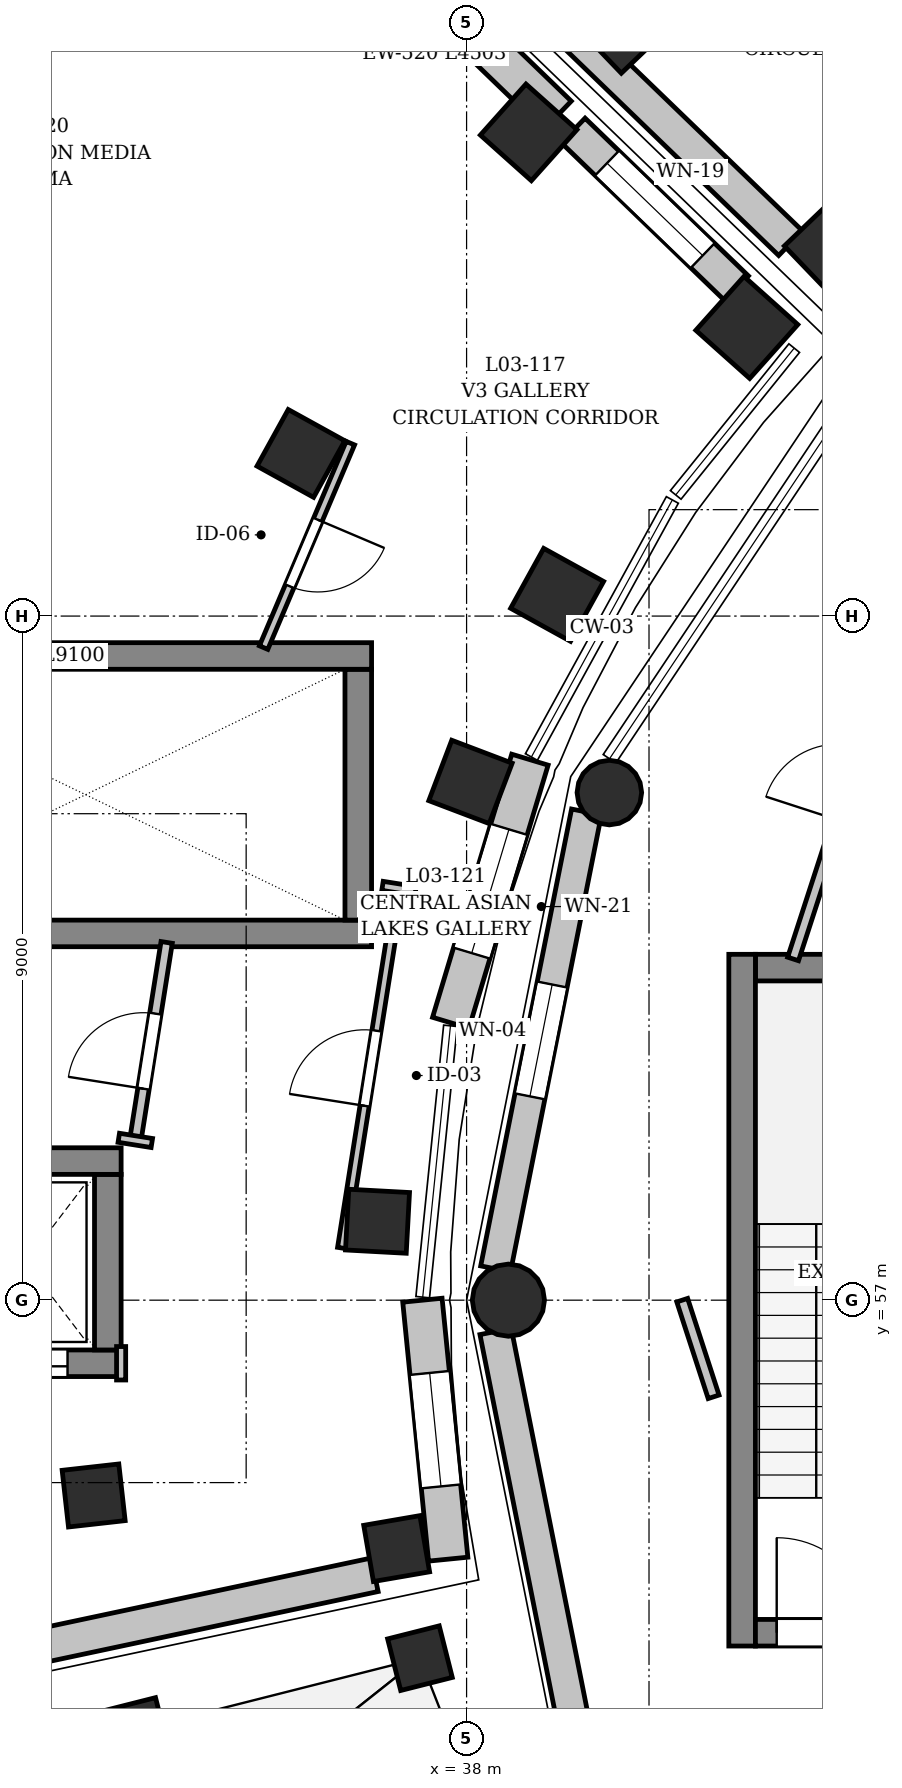
"""IFC4 building model, lengths in metres.
Left out: names, types, materials, properties, quantities, classifications, styles, units other than length and angle.
Written with IfcOpenShell. Run it as: python <this file> out.ifc"""

import sys

from ifc_helpers import new_model, si_unit, direction, frame, frame_2d, origin, origin_2d, place, context, subcontext, project, spatial, rectangle, circle, extrude, element, fill, save


model = new_model("IFC4")
c1 = context("Model", 3, precision=1e-05, world=origin(), true_north=direction((0.0, 1.0)))
c2 = subcontext(c1, "Body", "Model", "MODEL_VIEW")
j1 = project(units=[si_unit("LENGTHUNIT", "METRE"), si_unit("PLANEANGLEUNIT", "RADIAN")], contexts=[c1])
p1 = place(None, origin())
s1 = spatial("IfcSite", under=j1, at=p1, CompositionType="ELEMENT")
p2 = place(p1, origin())
s2 = spatial("IfcBuilding", under=s1, at=p2, CompositionType="ELEMENT")
p3 = place(p2, frame((0.0, 0.0, 10.2)))
s3 = spatial("IfcBuildingStorey", under=s2, at=p3, CompositionType="ELEMENT", Elevation=10.2)
p4 = place(p3, frame((39.878, 63.678, 0.0), z_axis=(0.0, 0.0, 1.0), x_axis=(-0.923879532511, 0.382683432365, 0.0)))
e1 = element("IfcColumn", 1, at=p4, inside=s3, PredefinedType="COLUMN", context=c2, shape_type="SweptSolid", body=[
    extrude(circle(Radius=0.425, at=origin_2d()), origin(), (0.0, 0.0, 1.0), 4.45),
])
p5 = place(p3, frame((38.55, 57.0, 0.0), z_axis=(0.0, 0.0, 1.0), x_axis=(-1.0, 0.0, 0.0)))
e2 = element("IfcColumn", 2, at=p5, inside=s3, PredefinedType="COLUMN", context=c2, shape_type="SweptSolid", body=[
    extrude(circle(Radius=0.475, at=origin_2d()), origin(), (0.0, 0.0, 1.0), 4.45),
])
p6 = place(p3, frame((41.687, 69.797, 0.0), z_axis=(0.0, 0.0, 1.0), x_axis=(-0.745475999683, 0.666532470249, 0.0)))
e3 = element("IfcColumn", 3, at=p6, inside=s3, PredefinedType="COLUMN", context=c2, shape_type="SweptSolid", body=[
    extrude(rectangle(XDim=0.95, YDim=0.95, at=origin_2d()), origin(), (0.0, 0.0, 1.0), 4.58),
])
for number, where, z_axis, x_axis in (
    (4, (38.817, 72.364, 0.0), (0.0, 0.0, 1.0), (-0.745, 0.667, 0.0)),
    (5, (39.191, 66.279, 0.0), (0.0, 0.0, 1.0), (-0.875, 0.483, 0.0)),
):
    element("IfcColumn", number, at=place(p3, frame(where, z_axis=z_axis, x_axis=x_axis)), inside=s3, PredefinedType="COLUMN", context=c2, shape_type="SweptSolid", body=[
        extrude(rectangle(XDim=0.9, YDim=0.9, at=origin_2d()), origin(), (0.0, 0.0, 1.0), 4.58),
    ])
for number, where, z_axis, x_axis in (
    (6, (35.821, 68.14, 0.0), (0.0, 0.0, 1.0), (-0.875, 0.483, 0.0)),
    (7, (38.051, 63.818, 0.0), (0.0, 0.0, 1.0), (-0.935, 0.355, 0.0)),
):
    element("IfcColumn", number, at=place(p3, frame(where, z_axis=z_axis, x_axis=x_axis)), inside=s3, PredefinedType="COLUMN", context=c2, shape_type="SweptSolid", body=[
        extrude(rectangle(XDim=0.85, YDim=0.85, at=origin_2d()), origin(), (0.0, 0.0, 1.0), 4.58),
    ])
p7 = place(p3, frame((36.828, 58.038, 0.0), z_axis=(0.0, 0.0, 1.0), x_axis=(-0.998536670326, 0.054078812985, 0.0)))
e8 = element("IfcColumn", 8, at=p7, inside=s3, PredefinedType="COLUMN", context=c2, shape_type="SweptSolid", body=[
    extrude(rectangle(XDim=0.8, YDim=0.8, at=origin_2d()), origin(), (0.0, 0.0, 1.0), 4.58),
])
for number, where, z_axis, x_axis in (
    (9, (33.094, 54.431, 0.0), (0.0, 0.0, 1.0), (-0.994, -0.111, 0.0)),
    (10, (37.08, 53.732, 0.0), (0.0, 0.0, 1.0), (-0.985, -0.17, 0.0)),
):
    element("IfcColumn", number, at=place(p3, frame(where, z_axis=z_axis, x_axis=x_axis)), inside=s3, PredefinedType="COLUMN", context=c2, shape_type="SweptSolid", body=[
        extrude(rectangle(XDim=0.75, YDim=0.75, at=origin_2d()), origin(), (0.0, 0.0, 1.0), 4.58),
    ])
p8 = place(p3, frame((42.711, 70.858, 0.0), z_axis=(0.0, 0.0, 1.0), x_axis=(-0.69214317387, 0.721760228098, 0.0)))
e11 = element("IfcColumn", 11, at=p8, inside=s3, PredefinedType="COLUMN", context=c2, shape_type="SweptSolid", body=[
    extrude(rectangle(XDim=0.75, YDim=0.75, at=origin_2d()), origin(), (0.0, 0.0, 1.0), 4.52),
])
p9 = place(p3, frame((40.046, 73.637, 0.0), z_axis=(0.0, 0.0, 1.0), x_axis=(-0.69214317387, 0.721760228098, 0.0)))
e12 = element("IfcColumn", 12, at=p9, inside=s3, PredefinedType="COLUMN", context=c2, shape_type="SweptSolid", body=[
    extrude(rectangle(XDim=0.7, YDim=0.7, at=origin_2d()), origin(), (0.0, 0.0, 1.0), 4.52),
])
p10 = place(p3, frame((37.387, 52.29, -0.22), z_axis=(0.0, 0.0, 1.0), x_axis=(-0.969445349895, -0.245307385879, 0.0)))
e13 = element("IfcColumn", 13, at=p10, inside=s3, PredefinedType="COLUMN", context=c2, shape_type="SweptSolid", body=[
    extrude(rectangle(XDim=0.7, YDim=0.7, at=origin_2d()), origin(), (0.0, 0.0, 1.0), 0.423),
])
p11 = place(p3, frame((33.654, 51.346, -0.22), z_axis=(0.0, 0.0, 1.0), x_axis=(-0.969445349895, -0.245307385879, 0.0)))
e14 = element("IfcColumn", 14, at=p11, inside=s3, PredefinedType="COLUMN", context=c2, shape_type="SweptSolid", body=[
    extrude(rectangle(XDim=0.7, YDim=0.7, at=origin_2d()), origin(), (0.0, 0.0, 1.0), 0.851),
])
p12 = place(p3, frame((38.382, 57.412, 0.0), z_axis=(0.0, 0.0, 1.0), x_axis=(0.195089418663, 0.980785460091, 0.0)))
e15 = element("IfcWall", 15, at=p12, inside=s3, PredefinedType="SOLIDWALL", context=c2, shape_type="SweptSolid", body=[
    extrude(rectangle(XDim=6.128, YDim=0.4, at=frame_2d((3.064, 0.0))), origin(), (0.0, 0.0, 1.0), 3.94),
])
p13 = place(p12, frame((2.314, 0.0, 0.9)))
e16 = element("IfcOpeningElement", 16, at=p13, cuts=e15, PredefinedType="OPENING", context=c2, shape_type="SweptSolid", body=[
    extrude(rectangle(XDim=1.5, YDim=2.1, at=frame_2d((0.75, 1.05))), frame((0.0, 0.21, 0.0), z_axis=(0.0, -1.0, 0.0), x_axis=(1.0, 0.0, 0.0)), (0.0, 0.0, 1.0), 0.42),
])
p14 = place(p3, frame((39.577, 50.578, 0.0), z_axis=(0.0, 0.0, 1.0), x_axis=(-0.195089418663, 0.980785460091, 0.0)))
e17 = element("IfcWall", 17, at=p14, inside=s3, PredefinedType="SOLIDWALL", context=c2, shape_type="SweptSolid", body=[
    extrude(rectangle(XDim=6.128, YDim=0.42, at=frame_2d((3.064, 0.0))), origin(), (0.0, 0.0, 1.0), 3.52),
])
p15 = place(p3, frame((38.833, 64.111, 0.0), z_axis=(0.0, 0.0, 1.0), x_axis=(-0.288190467342, -0.957573106626, 0.0)))
e18 = element("IfcWall", 18, at=p15, inside=s3, PredefinedType="SOLIDWALL", context=c2, shape_type="SweptSolid", body=[
    extrude(rectangle(XDim=3.615, YDim=0.5, at=frame_2d((1.807, 0.0))), origin(), (0.0, 0.0, 1.0), 5.16),
])
p16 = place(p15, frame((0.958, 0.0, 0.9)))
e19 = element("IfcOpeningElement", 19, at=p16, cuts=e18, PredefinedType="OPENING", context=c2, shape_type="SweptSolid", body=[
    extrude(rectangle(XDim=1.7, YDim=1.55, at=frame_2d((0.85, 0.775))), frame((0.0, 0.26, 0.0), z_axis=(0.0, -1.0, 0.0), x_axis=(1.0, 0.0, 0.0)), (0.0, 0.0, 1.0), 0.52),
])
p17 = place(p3, frame((37.419, 57.0, 0.0), z_axis=(0.0, 0.0, 1.0), x_axis=(0.09912244439, -0.995075243898, 0.0)))
e20 = element("IfcWall", 20, at=p17, inside=s3, PredefinedType="SOLIDWALL", context=c2, shape_type="SweptSolid", body=[
    extrude(rectangle(XDim=3.424, YDim=0.52, at=frame_2d((1.712, 0.0))), origin(), (0.0, 0.0, 1.0), 5.16),
])
p18 = place(p17, frame((0.962, 0.0, 0.9)))
e21 = element("IfcOpeningElement", 21, at=p18, cuts=e20, PredefinedType="OPENING", context=c2, shape_type="SweptSolid", body=[
    extrude(rectangle(XDim=1.5, YDim=2.1, at=frame_2d((0.75, 1.05))), frame((0.0, 0.27, 0.0), z_axis=(0.0, -1.0, 0.0), x_axis=(1.0, 0.0, 0.0)), (0.0, 0.0, 1.0), 0.54),
])
p19 = place(p3, frame((36.79, 53.387, 0.0), z_axis=(0.0, 0.0, 1.0), x_axis=(-0.978151790835, -0.207891976965, 0.0)))
e22 = element("IfcWall", 22, at=p19, inside=s3, PredefinedType="SOLIDWALL", context=c2, shape_type="SweptSolid", body=[
    extrude(rectangle(XDim=6.153, YDim=0.45, at=frame_2d((3.076, 0.0))), origin(), (0.0, 0.0, 1.0), 4.723),
])
p20 = place(p3, frame((35.958, 75.715, 0.0), z_axis=(0.0, 0.0, 1.0), x_axis=(0.719334191316, -0.694664178725, 0.0)))
e23 = element("IfcWall", 23, at=p20, inside=s3, PredefinedType="SOLIDWALL", context=c2, shape_type="SweptSolid", body=[
    extrude(rectangle(XDim=4.503, YDim=0.52, at=frame_2d((2.251, 0.0))), origin(), (0.0, 0.0, 1.0), 5.602),
])
p21 = place(p20, frame((1.477, 0.0, 0.9)))
e24 = element("IfcOpeningElement", 24, at=p21, cuts=e23, PredefinedType="OPENING", context=c2, shape_type="SweptSolid", body=[
    extrude(rectangle(XDim=1.55, YDim=1.85, at=frame_2d((0.775, 0.925))), frame((0.0, 0.27, 0.0), z_axis=(0.0, -1.0, 0.0), x_axis=(1.0, 0.0, 0.0)), (0.0, 0.0, 1.0), 0.54),
])
p22 = place(p3, frame((39.403, 72.389, 0.0), z_axis=(0.0, 0.0, 1.0), x_axis=(0.719339497973, -0.694658683568, 0.0)))
e25 = element("IfcWall", 25, at=p22, inside=s3, PredefinedType="SOLIDWALL", context=c2, shape_type="SweptSolid", body=[
    extrude(rectangle(XDim=2.987, YDim=0.45, at=frame_2d((1.494, 0.0))), origin(), (0.0, 0.0, 1.0), 4.723),
])
p23 = place(p22, frame((0.619, 0.0, 0.9)))
e26 = element("IfcOpeningElement", 26, at=p23, cuts=e25, PredefinedType="OPENING", context=c2, shape_type="SweptSolid", body=[
    extrude(rectangle(XDim=1.75, YDim=1.85, at=frame_2d((0.875, 0.925))), frame((0.0, 0.235, 0.0), z_axis=(0.0, -1.0, 0.0), x_axis=(1.0, 0.0, 0.0)), (0.0, 0.0, 1.0), 0.47),
])
p24 = place(p3, frame((42.262, 70.906, 0.0), z_axis=(0.0, 0.0, 1.0), x_axis=(-0.719350100281, 0.694647704398, 0.0)))
e27 = element("IfcWall", 27, at=p24, inside=s3, PredefinedType="SOLIDWALL", context=c2, shape_type="SweptSolid", body=[
    extrude(rectangle(XDim=11.959, YDim=0.45, at=frame_2d((5.979, 0.0))), origin(), (0.0, 0.0, 1.0), 3.66),
])
p25 = place(p24, frame((3.984, 0.0, 0.9)))
e28 = element("IfcOpeningElement", 28, at=p25, cuts=e27, PredefinedType="OPENING", context=c2, shape_type="SweptSolid", body=[
    extrude(rectangle(XDim=1.95, YDim=2.0, at=frame_2d((0.975, 1.0))), frame((0.0, 0.235, 0.0), z_axis=(0.0, -1.0, 0.0), x_axis=(1.0, 0.0, 0.0)), (0.0, 0.0, 1.0), 0.47),
])
p26 = place(p24, frame((6.804, 0.0, 0.9)))
e29 = element("IfcOpeningElement", 29, at=p26, cuts=e27, PredefinedType="OPENING", context=c2, shape_type="SweptSolid", body=[
    extrude(rectangle(XDim=1.95, YDim=2.0, at=frame_2d((0.975, 1.0))), frame((0.0, 0.235, 0.0), z_axis=(0.0, -1.0, 0.0), x_axis=(1.0, 0.0, 0.0)), (0.0, 0.0, 1.0), 0.47),
])
p27 = place(p3, frame((45.2, 61.375, 0.0), z_axis=(0.0, 0.0, 1.0), x_axis=(-1.0, 0.0, 0.0)))
e30 = element("IfcWall", 30, at=p27, inside=s3, PredefinedType="SHEAR", context=c2, shape_type="SweptSolid", body=[
    extrude(rectangle(XDim=3.4, YDim=0.35, at=frame_2d((1.7, 0.0))), origin(), (0.0, 0.0, 1.0), 4.45),
])
p28 = place(p3, frame((41.625, 61.55, 0.0), z_axis=(0.0, 0.0, 1.0), x_axis=(0.0, -1.0, 0.0)))
e31 = element("IfcWall", 31, at=p28, inside=s3, PredefinedType="SHEAR", context=c2, shape_type="SweptSolid", body=[
    extrude(rectangle(XDim=9.1, YDim=0.35, at=frame_2d((4.55, 0.0))), origin(), (0.0, 0.0, 1.0), 4.45),
])
p29 = place(p3, frame((41.8, 52.625, 0.0), z_axis=(0.0, 0.0, 1.0), x_axis=(1.0, 0.0, 0.0)))
e32 = element("IfcWall", 32, at=p29, inside=s3, PredefinedType="SHEAR", context=c2, shape_type="SweptSolid", body=[
    extrude(rectangle(XDim=3.4, YDim=0.35, at=frame_2d((1.7, 0.0))), origin(), (0.0, 0.0, 1.0), 4.45),
])
p30 = place(p29, frame((0.28, 0.0, 0.0)))
e33 = element("IfcOpeningElement", 33, at=p30, cuts=e32, PredefinedType="OPENING", context=c2, shape_type="SweptSolid", body=[
    extrude(rectangle(XDim=1.25, YDim=2.2, at=frame_2d((0.625, 1.1))), frame((0.0, 0.185, 0.0), z_axis=(0.0, -1.0, 0.0), x_axis=(1.0, 0.0, 0.0)), (0.0, 0.0, 1.0), 0.37),
])
p31 = place(p3, frame((27.65, 61.825, 0.0), z_axis=(0.0, 0.0, 1.0), x_axis=(1.0, 0.0, 0.0)))
e34 = element("IfcWall", 34, at=p31, inside=s3, PredefinedType="SHEAR", context=c2, shape_type="SweptSolid", body=[
    extrude(rectangle(XDim=9.1, YDim=0.35, at=frame_2d((4.55, 0.0))), origin(), (0.0, 0.0, 1.0), 3.6),
])
p32 = place(p3, frame((36.575, 62.0, 0.0), z_axis=(0.0, 0.0, 1.0), x_axis=(0.0, 1.0, 0.0)))
e35 = element("IfcWall", 35, at=p32, inside=s3, PredefinedType="SHEAR", context=c2, shape_type="SweptSolid", body=[
    extrude(rectangle(XDim=3.3, YDim=0.35, at=frame_2d((1.65, 0.0))), origin(), (0.0, 0.0, 1.0), 3.6),
])
p33 = place(p3, frame((36.75, 65.475, 0.0), z_axis=(0.0, 0.0, 1.0), x_axis=(-1.0, 0.0, 0.0)))
e36 = element("IfcWall", 36, at=p33, inside=s3, PredefinedType="SHEAR", context=c2, shape_type="SweptSolid", body=[
    extrude(rectangle(XDim=9.1, YDim=0.35, at=frame_2d((4.55, 0.0))), origin(), (0.0, 0.0, 1.0), 3.6),
])
p34 = place(p3, frame((30.945, 56.17, 0.0), z_axis=(0.0, 0.0, 1.0), x_axis=(1.0, 0.0, 0.0)))
e37 = element("IfcWall", 37, at=p34, inside=s3, PredefinedType="SHEAR", context=c2, shape_type="SweptSolid", body=[
    extrude(rectangle(XDim=2.51, YDim=0.35, at=frame_2d((1.255, 0.0))), origin(), (0.0, 0.0, 1.0), 3.6),
])
p35 = place(p34, frame((0.705, 0.0, 0.0)))
e38 = element("IfcOpeningElement", 38, at=p35, cuts=e37, PredefinedType="OPENING", context=c2, shape_type="SweptSolid", body=[
    extrude(rectangle(XDim=1.1, YDim=2.2, at=frame_2d((0.55, 1.1))), frame((0.0, 0.185, 0.0), z_axis=(0.0, -1.0, 0.0), x_axis=(1.0, 0.0, 0.0)), (0.0, 0.0, 1.0), 0.37),
])
p36 = place(p3, frame((33.28, 56.345, 0.0), z_axis=(0.0, 0.0, 1.0), x_axis=(0.0, 1.0, 0.0)))
e39 = element("IfcWall", 39, at=p36, inside=s3, PredefinedType="SHEAR", context=c2, shape_type="SweptSolid", body=[
    extrude(rectangle(XDim=2.31, YDim=0.35, at=frame_2d((1.155, 0.0))), origin(), (0.0, 0.0, 1.0), 3.6),
])
p37 = place(p3, frame((33.455, 58.83, 0.0), z_axis=(0.0, 0.0, 1.0), x_axis=(-1.0, 0.0, 0.0)))
e40 = element("IfcWall", 40, at=p37, inside=s3, PredefinedType="SHEAR", context=c2, shape_type="SweptSolid", body=[
    extrude(rectangle(XDim=2.51, YDim=0.35, at=frame_2d((1.255, 0.0))), origin(), (0.0, 0.0, 1.0), 3.6),
])
p38 = place(p3, frame((42.295, 61.489, 0.0), z_axis=(0.0, 0.0, 1.0), x_axis=(0.309018385136, 0.951056064408, 0.0)))
e41 = element("IfcWall", 41, at=p38, inside=s3, PredefinedType="PARTITIONING", context=c2, shape_type="SweptSolid", body=[
    extrude(rectangle(XDim=4.567, YDim=0.15, at=frame_2d((2.284, 0.0))), origin(), (0.0, 0.0, 1.0), 4.45),
])
p39 = place(p38, frame((1.921, 0.0, 0.0)))
e42 = element("IfcOpeningElement", 42, at=p39, cuts=e41, PredefinedType="OPENING", context=c2, shape_type="SweptSolid", body=[
    extrude(rectangle(XDim=1.0, YDim=2.2, at=frame_2d((0.5, 1.1))), frame((0.0, 0.085, 0.0), z_axis=(0.0, -1.0, 0.0), x_axis=(1.0, 0.0, 0.0)), (0.0, 0.0, 1.0), 0.17),
])
p40 = place(p3, frame((41.25, 55.729, 0.0), z_axis=(0.0, 0.0, 1.0), x_axis=(-0.30898696848, 0.951066271776, 0.0)))
e43 = element("IfcWall", 43, at=p40, inside=s3, PredefinedType="PARTITIONING", context=c2, shape_type="SweptSolid", body=[
    extrude(rectangle(XDim=1.337, YDim=0.15, at=frame_2d((0.668, 0.0))), origin(), (0.0, 0.0, 1.0), 4.45),
])
p41 = place(p3, frame((36.362, 57.686, 0.0), z_axis=(0.0, 0.0, 1.0), x_axis=(0.156391852422, 0.987695088829, 0.0)))
e44 = element("IfcWall", 44, at=p41, inside=s3, PredefinedType="PARTITIONING", context=c2, shape_type="SweptSolid", body=[
    extrude(rectangle(XDim=4.789, YDim=0.12, at=frame_2d((2.395, 0.0))), origin(), (0.0, 0.0, 1.0), 3.55),
])
p42 = place(p41, frame((1.895, 0.0, 0.0)))
e45 = element("IfcOpeningElement", 45, at=p42, cuts=e44, PredefinedType="OPENING", context=c2, shape_type="SweptSolid", body=[
    extrude(rectangle(XDim=1.0, YDim=2.2, at=frame_2d((0.5, 1.1))), frame((0.0, 0.07, 0.0), z_axis=(0.0, -1.0, 0.0), x_axis=(1.0, 0.0, 0.0)), (0.0, 0.0, 1.0), 0.14),
])
p43 = place(p3, frame((36.471, 68.275, 0.0), z_axis=(0.0, 0.0, 1.0), x_axis=(-0.39080089657, -0.920475235539, 0.0)))
e46 = element("IfcWall", 46, at=p43, inside=s3, PredefinedType="PARTITIONING", context=c2, shape_type="SweptSolid", body=[
    extrude(rectangle(XDim=2.922, YDim=0.12, at=frame_2d((1.461, 0.0))), origin(), (0.0, 0.0, 1.0), 3.55),
])
p44 = place(p43, frame((1.095, 0.0, 0.0)))
e47 = element("IfcOpeningElement", 47, at=p44, cuts=e46, PredefinedType="OPENING", context=c2, shape_type="SweptSolid", body=[
    extrude(rectangle(XDim=0.95, YDim=2.2, at=frame_2d((0.475, 1.1))), frame((0.0, 0.07, 0.0), z_axis=(0.0, -1.0, 0.0), x_axis=(1.0, 0.0, 0.0)), (0.0, 0.0, 1.0), 0.14),
])
p45 = place(p3, frame((33.642, 59.102, 0.0), z_axis=(0.0, 0.0, 1.0), x_axis=(0.156466508954, 0.987683264805, 0.0)))
e48 = element("IfcWall", 48, at=p45, inside=s3, PredefinedType="PARTITIONING", context=c2, shape_type="SweptSolid", body=[
    extrude(rectangle(XDim=2.637, YDim=0.15, at=frame_2d((1.318, 0.0))), origin(), (0.0, 0.0, 1.0), 3.55),
])
p46 = place(p45, frame((0.689, 0.0, 0.0)))
e49 = element("IfcOpeningElement", 49, at=p46, cuts=e48, PredefinedType="OPENING", context=c2, shape_type="SweptSolid", body=[
    extrude(rectangle(XDim=1.0, YDim=2.2, at=frame_2d((0.5, 1.1))), frame((0.0, 0.085, 0.0), z_axis=(0.0, -1.0, 0.0), x_axis=(1.0, 0.0, 0.0)), (0.0, 0.0, 1.0), 0.17),
])
p47 = place(p3, frame((33.455, 55.95, 0.0), z_axis=(0.0, 0.0, 1.0), x_axis=(0.0, 1.0, 0.0)))
e50 = element("IfcWall", 50, at=p47, inside=s3, PredefinedType="PARTITIONING", context=c2, shape_type="SweptSolid", body=[
    extrude(rectangle(XDim=0.44, YDim=0.12, at=frame_2d((0.22, 0.0))), origin(), (0.0, 0.0, 1.0), 3.55),
])
p48 = place(p3, frame((37.329, 62.382, 0.0), z_axis=(0.0, 0.0, 1.0), x_axis=(-0.987695424831, 0.156389730378, 0.0)))
e51 = element("IfcWall", 51, at=p48, inside=s3, PredefinedType="PARTITIONING", context=c2, shape_type="SweptSolid", body=[
    extrude(rectangle(XDim=0.44, YDim=0.12, at=frame_2d((0.22, 0.0))), origin(), (0.0, 0.0, 1.0), 3.55),
])
p49 = place(p3, frame((33.859, 59.068, 0.0), z_axis=(0.0, 0.0, 1.0), x_axis=(-0.98768185006, 0.156475439167, 0.0)))
e52 = element("IfcWall", 52, at=p49, inside=s3, PredefinedType="PARTITIONING", context=c2, shape_type="SweptSolid", body=[
    extrude(rectangle(XDim=0.44, YDim=0.12, at=frame_2d((0.22, 0.0))), origin(), (0.0, 0.0, 1.0), 3.55),
])
p50 = place(p13, origin())
e53 = element("IfcWindow", 53, at=p50, inside=s3, PartitioningType="DOUBLE_PANEL_VERTICAL", PredefinedType="WINDOW", context=c2, shape_type="SweptSolid", body=[
    extrude(rectangle(XDim=1.5, YDim=2.1, at=frame_2d((0.75, 1.05))), frame((0.0, 0.03, 0.0), z_axis=(0.0, -1.0, 0.0), x_axis=(1.0, 0.0, 0.0)), (0.0, 0.0, 1.0), 0.06),
])
fill(e16, e53)
p51 = place(p16, origin())
e54 = element("IfcWindow", 54, at=p51, inside=s3, PartitioningType="DOUBLE_PANEL_VERTICAL", PredefinedType="WINDOW", context=c2, shape_type="SweptSolid", body=[
    extrude(rectangle(XDim=1.7, YDim=1.55, at=frame_2d((0.85, 0.775))), frame((0.0, 0.03, 0.0), z_axis=(0.0, -1.0, 0.0), x_axis=(1.0, 0.0, 0.0)), (0.0, 0.0, 1.0), 0.06),
])
fill(e19, e54)
p52 = place(p18, origin())
e55 = element("IfcWindow", 55, at=p52, inside=s3, PartitioningType="DOUBLE_PANEL_VERTICAL", PredefinedType="WINDOW", context=c2, shape_type="SweptSolid", body=[
    extrude(rectangle(XDim=1.5, YDim=2.1, at=frame_2d((0.75, 1.05))), frame((0.0, 0.03, 0.0), z_axis=(0.0, -1.0, 0.0), x_axis=(1.0, 0.0, 0.0)), (0.0, 0.0, 1.0), 0.06),
])
fill(e21, e55)
p53 = place(p23, origin())
e56 = element("IfcWindow", 56, at=p53, inside=s3, PartitioningType="DOUBLE_PANEL_VERTICAL", PredefinedType="WINDOW", context=c2, shape_type="SweptSolid", body=[
    extrude(rectangle(XDim=1.75, YDim=1.85, at=frame_2d((0.875, 0.925))), frame((0.0, 0.03, 0.0), z_axis=(0.0, -1.0, 0.0), x_axis=(1.0, 0.0, 0.0)), (0.0, 0.0, 1.0), 0.06),
])
fill(e26, e56)
p54 = place(p30, origin())
e57 = element("IfcDoor", 57, at=p54, inside=s3, OperationType="SINGLE_SWING_RIGHT", PredefinedType="DOOR", context=c2, shape_type="SweptSolid", body=[
    extrude(rectangle(XDim=1.25, YDim=2.2, at=frame_2d((0.625, 1.1))), frame((0.0, 0.025, 0.0), z_axis=(0.0, -1.0, 0.0), x_axis=(1.0, 0.0, 0.0)), (0.0, 0.0, 1.0), 0.05),
])
fill(e33, e57)
p55 = place(p35, origin())
e58 = element("IfcDoor", 58, at=p55, inside=s3, OperationType="SLIDING_TO_LEFT", PredefinedType="DOOR", context=c2, shape_type="SweptSolid", body=[
    extrude(rectangle(XDim=1.1, YDim=2.2, at=frame_2d((0.55, 1.1))), frame((0.0, 0.025, 0.0), z_axis=(0.0, -1.0, 0.0), x_axis=(1.0, 0.0, 0.0)), (0.0, 0.0, 1.0), 0.05),
])
fill(e38, e58)
p56 = place(p42, origin())
e59 = element("IfcDoor", 59, at=p56, inside=s3, OperationType="SINGLE_SWING_RIGHT", PredefinedType="DOOR", context=c2, shape_type="SweptSolid", body=[
    extrude(rectangle(XDim=1.0, YDim=2.2, at=frame_2d((0.5, 1.1))), frame((0.0, 0.025, 0.0), z_axis=(0.0, -1.0, 0.0), x_axis=(1.0, 0.0, 0.0)), (0.0, 0.0, 1.0), 0.05),
])
fill(e45, e59)
p57 = place(p46, origin())
e60 = element("IfcDoor", 60, at=p57, inside=s3, OperationType="SINGLE_SWING_LEFT", PredefinedType="DOOR", context=c2, shape_type="SweptSolid", body=[
    extrude(rectangle(XDim=1.0, YDim=2.2, at=frame_2d((0.5, 1.1))), frame((0.0, 0.025, 0.0), z_axis=(0.0, -1.0, 0.0), x_axis=(1.0, 0.0, 0.0)), (0.0, 0.0, 1.0), 0.05),
])
fill(e49, e60)
p58 = place(p44, origin())
e61 = element("IfcDoor", 61, at=p58, inside=s3, OperationType="SINGLE_SWING_RIGHT", PredefinedType="DOOR", context=c2, shape_type="SweptSolid", body=[
    extrude(rectangle(XDim=0.95, YDim=2.2, at=frame_2d((0.475, 1.1))), frame((0.0, 0.025, 0.0), z_axis=(0.0, -1.0, 0.0), x_axis=(1.0, 0.0, 0.0)), (0.0, 0.0, 1.0), 0.05),
])
fill(e47, e61)
save(model, sys.argv[1])
